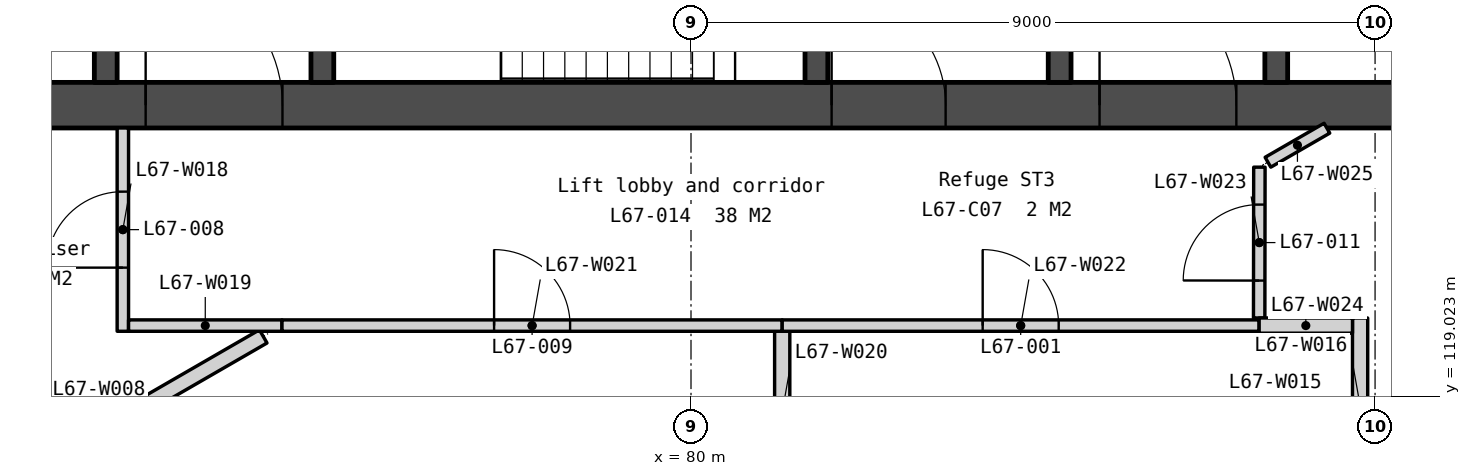
"""IFC4 building model, lengths in metres.
Left out: names, types, materials, properties, quantities, classifications, styles, units other than length and angle.
Written with IfcOpenShell. Run it as: python <this file> out.ifc"""

import sys

from ifc_helpers import new_model, si_unit, direction, frame, frame_2d, origin, place, context, subcontext, project, spatial, polyline, rectangle, outline, extrude, element, fill, save


model = new_model("IFC4")
c1 = context("Model", 3, precision=1e-05, world=origin(), true_north=direction((0.0, 1.0)))
c2 = subcontext(c1, "Body", "Model", "MODEL_VIEW")
j1 = project(units=[si_unit("LENGTHUNIT", "METRE"), si_unit("PLANEANGLEUNIT", "RADIAN")], contexts=[c1])
p1 = place(None, origin())
s1 = spatial("IfcSite", under=j1, at=p1, CompositionType="ELEMENT")
p2 = place(p1, origin())
s2 = spatial("IfcBuilding", under=s1, at=p2, CompositionType="ELEMENT")
p3 = place(p2, frame((0.0, 0.0, 273.8)))
s3 = spatial("IfcBuildingStorey", under=s2, at=p3, CompositionType="ELEMENT", Elevation=273.8)
p4 = place(p3, frame((69.0, 122.85, 0.0), z_axis=(0.0, 0.0, 1.0), x_axis=(1.0, 0.0, 0.0)))
e1 = element("IfcWall", 1, at=p4, inside=s3, PredefinedType="SOLIDWALL", context=c2, shape_type="SweptSolid", body=[
    extrude(rectangle(XDim=22.0, YDim=0.6, at=frame_2d((11.0, 0.0))), origin(), (0.0, 0.0, 1.0), 3.75),
])
p5 = place(p4, frame((16.375, 0.0, 0.0)))
e2 = element("IfcOpeningElement", 2, at=p5, cuts=e1, PredefinedType="OPENING", context=c2, shape_type="SweptSolid", body=[
    extrude(rectangle(XDim=1.8, YDim=2.1, at=frame_2d((0.9, 1.05))), frame((0.0, 0.31, 0.0), z_axis=(0.0, -1.0, 0.0), x_axis=(1.0, 0.0, 0.0)), (0.0, 0.0, 1.0), 0.62),
])
p6 = place(p4, frame((3.825, 0.0, 0.0)))
e3 = element("IfcOpeningElement", 3, at=p6, cuts=e1, PredefinedType="OPENING", context=c2, shape_type="SweptSolid", body=[
    extrude(rectangle(XDim=1.8, YDim=2.1, at=frame_2d((0.9, 1.05))), frame((0.0, 0.31, 0.0), z_axis=(0.0, -1.0, 0.0), x_axis=(1.0, 0.0, 0.0)), (0.0, 0.0, 1.0), 0.62),
])
p7 = place(p4, frame((12.85, 0.0, 0.0)))
e4 = element("IfcOpeningElement", 4, at=p7, cuts=e1, PredefinedType="OPENING", context=c2, shape_type="SweptSolid", body=[
    extrude(rectangle(XDim=1.5, YDim=2.1, at=frame_2d((0.75, 1.05))), frame((0.0, 0.31, 0.0), z_axis=(0.0, -1.0, 0.0), x_axis=(1.0, 0.0, 0.0)), (0.0, 0.0, 1.0), 0.62),
])
p8 = place(p3, frame((72.3, 133.95, 0.0), z_axis=(0.0, 0.0, 1.0), x_axis=(0.0, -1.0, 0.0)))
e5 = element("IfcWall", 5, at=p8, inside=s3, PredefinedType="SOLIDWALL", context=c2, shape_type="SweptSolid", body=[
    extrude(rectangle(XDim=10.8, YDim=0.3, at=frame_2d((5.4, 0.0))), origin(), (0.0, 0.0, 1.0), 3.75),
])
p9 = place(p8, frame((6.95, 0.0, 0.0)))
e6 = element("IfcOpeningElement", 6, at=p9, cuts=e5, PredefinedType="OPENING", context=c2, shape_type="SweptSolid", body=[
    extrude(rectangle(XDim=1.1, YDim=2.1, at=frame_2d((0.55, 1.05))), frame((0.0, 0.16, 0.0), z_axis=(0.0, -1.0, 0.0), x_axis=(1.0, 0.0, 0.0)), (0.0, 0.0, 1.0), 0.32),
])
p10 = place(p8, frame((9.35, 0.0, 0.0)))
e7 = element("IfcOpeningElement", 7, at=p10, cuts=e5, PredefinedType="OPENING", context=c2, shape_type="SweptSolid", body=[
    extrude(rectangle(XDim=0.9, YDim=2.1, at=frame_2d((0.45, 1.05))), frame((0.0, 0.16, 0.0), z_axis=(0.0, -1.0, 0.0), x_axis=(1.0, 0.0, 0.0)), (0.0, 0.0, 1.0), 0.32),
])
p11 = place(p8, frame((5.1, 0.0, 0.0)))
e8 = element("IfcOpeningElement", 8, at=p11, cuts=e5, PredefinedType="OPENING", context=c2, shape_type="SweptSolid", body=[
    extrude(rectangle(XDim=1.0, YDim=2.1, at=frame_2d((0.5, 1.05))), frame((0.0, 0.16, 0.0), z_axis=(0.0, -1.0, 0.0), x_axis=(1.0, 0.0, 0.0)), (0.0, 0.0, 1.0), 0.32),
])
p12 = place(p3, frame((75.15, 125.7, 0.0), z_axis=(0.0, 0.0, 1.0), x_axis=(0.0, -1.0, 0.0)))
e9 = element("IfcWall", 9, at=p12, inside=s3, PredefinedType="SOLIDWALL", context=c2, shape_type="SweptSolid", body=[
    extrude(rectangle(XDim=2.55, YDim=0.3, at=frame_2d((1.275, 0.0))), origin(), (0.0, 0.0, 1.0), 3.75),
])
p13 = place(p3, frame((81.65, 125.7, 0.0), z_axis=(0.0, 0.0, 1.0), x_axis=(0.0, -1.0, 0.0)))
e10 = element("IfcWall", 10, at=p13, inside=s3, PredefinedType="SOLIDWALL", context=c2, shape_type="SweptSolid", body=[
    extrude(rectangle(XDim=2.55, YDim=0.3, at=frame_2d((1.275, 0.0))), origin(), (0.0, 0.0, 1.0), 3.75),
])
p14 = place(p13, frame((0.75, 0.0, 0.0)))
e11 = element("IfcOpeningElement", 11, at=p14, cuts=e10, PredefinedType="OPENING", context=c2, shape_type="SweptSolid", body=[
    extrude(rectangle(XDim=1.0, YDim=2.1, at=frame_2d((0.5, 1.05))), frame((0.0, 0.16, 0.0), z_axis=(0.0, -1.0, 0.0), x_axis=(1.0, 0.0, 0.0)), (0.0, 0.0, 1.0), 0.32),
])
p15 = place(p3, frame((84.85, 125.85, 0.0), z_axis=(0.0, 0.0, 1.0), x_axis=(0.0, -1.0, 0.0)))
e12 = element("IfcWall", 12, at=p15, inside=s3, PredefinedType="SOLIDWALL", context=c2, shape_type="SweptSolid", body=[
    extrude(rectangle(XDim=2.7, YDim=0.3, at=frame_2d((1.35, 0.0))), origin(), (0.0, 0.0, 1.0), 3.75),
])
p16 = place(p3, frame((87.7, 133.95, 0.0), z_axis=(0.0, 0.0, 1.0), x_axis=(0.0, -1.0, 0.0)))
e13 = element("IfcWall", 13, at=p16, inside=s3, PredefinedType="SOLIDWALL", context=c2, shape_type="SweptSolid", body=[
    extrude(rectangle(XDim=10.8, YDim=0.3, at=frame_2d((5.4, 0.0))), origin(), (0.0, 0.0, 1.0), 3.75),
])
p17 = place(p16, frame((6.95, 0.0, 0.0)))
e14 = element("IfcOpeningElement", 14, at=p17, cuts=e13, PredefinedType="OPENING", context=c2, shape_type="SweptSolid", body=[
    extrude(rectangle(XDim=1.1, YDim=2.1, at=frame_2d((0.55, 1.05))), frame((0.0, 0.16, 0.0), z_axis=(0.0, -1.0, 0.0), x_axis=(1.0, 0.0, 0.0)), (0.0, 0.0, 1.0), 0.32),
])
p18 = place(p16, frame((5.1, 0.0, 0.0)))
e15 = element("IfcOpeningElement", 15, at=p18, cuts=e13, PredefinedType="OPENING", context=c2, shape_type="SweptSolid", body=[
    extrude(rectangle(XDim=1.0, YDim=2.1, at=frame_2d((0.5, 1.05))), frame((0.0, 0.16, 0.0), z_axis=(0.0, -1.0, 0.0), x_axis=(1.0, 0.0, 0.0)), (0.0, 0.0, 1.0), 0.32),
])
p19 = place(p16, frame((9.25, 0.0, 0.0)))
e16 = element("IfcOpeningElement", 16, at=p19, cuts=e13, PredefinedType="OPENING", context=c2, shape_type="SweptSolid", body=[
    extrude(rectangle(XDim=1.1, YDim=2.1, at=frame_2d((0.55, 1.05))), frame((0.0, 0.16, 0.0), z_axis=(0.0, -1.0, 0.0), x_axis=(1.0, 0.0, 0.0)), (0.0, 0.0, 1.0), 0.32),
])
p20 = place(p3, frame((60.609, 133.207, -0.15), z_axis=(0.0, 0.0, 1.0), x_axis=(0.500002536638, -0.866023939251, 0.0)))
e17 = element("IfcWall", 17, at=p20, inside=s3, PredefinedType="SOLIDWALL", context=c2, shape_type="SweptSolid", body=[
    extrude(outline(polyline([(36.972, 0.0), (36.972, 3.9), (0.0, 3.9), (0.0, 0.0), (36.972, 0.0)])), frame((0.0, 0.225, 0.0), z_axis=(0.0, -1.0, 0.0), x_axis=(1.0, 0.0, 0.0)), (0.0, 0.0, 1.0), 0.45),
])
p21 = place(p20, frame((0.715, 0.0, 0.95)))
e18 = element("IfcOpeningElement", 18, at=p21, cuts=e17, PredefinedType="OPENING", context=c2, shape_type="SweptSolid", body=[
    extrude(rectangle(XDim=1.2, YDim=2.2, at=frame_2d((0.6, 1.1))), frame((0.0, 0.235, 0.0), z_axis=(0.0, -1.0, 0.0), x_axis=(1.0, 0.0, 0.0)), (0.0, 0.0, 1.0), 0.47),
])
p22 = place(p20, frame((7.793, 0.0, 0.95)))
e19 = element("IfcOpeningElement", 19, at=p22, cuts=e17, PredefinedType="OPENING", context=c2, shape_type="SweptSolid", body=[
    extrude(rectangle(XDim=1.2, YDim=2.2, at=frame_2d((0.6, 1.1))), frame((0.0, 0.235, 0.0), z_axis=(0.0, -1.0, 0.0), x_axis=(1.0, 0.0, 0.0)), (0.0, 0.0, 1.0), 0.47),
])
p23 = place(p20, frame((9.493, 0.0, 0.95)))
e20 = element("IfcOpeningElement", 20, at=p23, cuts=e17, PredefinedType="OPENING", context=c2, shape_type="SweptSolid", body=[
    extrude(rectangle(XDim=1.2, YDim=2.2, at=frame_2d((0.6, 1.1))), frame((0.0, 0.235, 0.0), z_axis=(0.0, -1.0, 0.0), x_axis=(1.0, 0.0, 0.0)), (0.0, 0.0, 1.0), 0.47),
])
p24 = place(p20, frame((17.036, 0.0, 0.95)))
e21 = element("IfcOpeningElement", 21, at=p24, cuts=e17, PredefinedType="OPENING", context=c2, shape_type="SweptSolid", body=[
    extrude(rectangle(XDim=1.2, YDim=2.2, at=frame_2d((0.6, 1.1))), frame((0.0, 0.235, 0.0), z_axis=(0.0, -1.0, 0.0), x_axis=(1.0, 0.0, 0.0)), (0.0, 0.0, 1.0), 0.47),
])
p25 = place(p20, frame((18.736, 0.0, 0.95)))
e22 = element("IfcOpeningElement", 22, at=p25, cuts=e17, PredefinedType="OPENING", context=c2, shape_type="SweptSolid", body=[
    extrude(rectangle(XDim=1.2, YDim=2.2, at=frame_2d((0.6, 1.1))), frame((0.0, 0.235, 0.0), z_axis=(0.0, -1.0, 0.0), x_axis=(1.0, 0.0, 0.0)), (0.0, 0.0, 1.0), 0.47),
])
p26 = place(p20, frame((26.279, 0.0, 0.95)))
e23 = element("IfcOpeningElement", 23, at=p26, cuts=e17, PredefinedType="OPENING", context=c2, shape_type="SweptSolid", body=[
    extrude(rectangle(XDim=1.2, YDim=2.2, at=frame_2d((0.6, 1.1))), frame((0.0, 0.235, 0.0), z_axis=(0.0, -1.0, 0.0), x_axis=(1.0, 0.0, 0.0)), (0.0, 0.0, 1.0), 0.47),
])
p27 = place(p20, frame((27.979, 0.0, 0.95)))
e24 = element("IfcOpeningElement", 24, at=p27, cuts=e17, PredefinedType="OPENING", context=c2, shape_type="SweptSolid", body=[
    extrude(rectangle(XDim=1.2, YDim=2.2, at=frame_2d((0.6, 1.1))), frame((0.0, 0.235, 0.0), z_axis=(0.0, -1.0, 0.0), x_axis=(1.0, 0.0, 0.0)), (0.0, 0.0, 1.0), 0.47),
])
p28 = place(p20, frame((35.058, 0.0, 0.95)))
e25 = element("IfcOpeningElement", 25, at=p28, cuts=e17, PredefinedType="OPENING", context=c2, shape_type="SweptSolid", body=[
    extrude(rectangle(XDim=1.2, YDim=2.2, at=frame_2d((0.6, 1.1))), frame((0.0, 0.235, 0.0), z_axis=(0.0, -1.0, 0.0), x_axis=(1.0, 0.0, 0.0)), (0.0, 0.0, 1.0), 0.47),
])
p29 = place(p3, frame((86.427, 110.752, -0.15), z_axis=(0.0, 0.0, 1.0), x_axis=(0.500000383388, 0.866025182435, 0.0)))
e26 = element("IfcWall", 26, at=p29, inside=s3, PredefinedType="SOLIDWALL", context=c2, shape_type="SweptSolid", body=[
    extrude(outline(polyline([(25.929, 3.9), (25.929, 0.0), (0.0, 0.0), (0.0, 3.9), (25.929, 3.9)])), frame((0.0, 0.225, 0.0), z_axis=(0.0, -1.0, 0.0), x_axis=(1.0, 0.0, 0.0)), (0.0, 0.0, 1.0), 0.45),
])
p30 = place(p29, frame((5.993, 0.0, 0.95)))
e27 = element("IfcOpeningElement", 27, at=p30, cuts=e26, PredefinedType="OPENING", context=c2, shape_type="SweptSolid", body=[
    extrude(rectangle(XDim=1.2, YDim=2.2, at=frame_2d((0.6, 1.1))), frame((0.0, 0.235, 0.0), z_axis=(0.0, -1.0, 0.0), x_axis=(1.0, 0.0, 0.0)), (0.0, 0.0, 1.0), 0.47),
])
p31 = place(p29, frame((7.693, 0.0, 0.95)))
e28 = element("IfcOpeningElement", 28, at=p31, cuts=e26, PredefinedType="OPENING", context=c2, shape_type="SweptSolid", body=[
    extrude(rectangle(XDim=1.2, YDim=2.2, at=frame_2d((0.6, 1.1))), frame((0.0, 0.235, 0.0), z_axis=(0.0, -1.0, 0.0), x_axis=(1.0, 0.0, 0.0)), (0.0, 0.0, 1.0), 0.47),
])
p32 = place(p29, frame((15.236, 0.0, 0.95)))
e29 = element("IfcOpeningElement", 29, at=p32, cuts=e26, PredefinedType="OPENING", context=c2, shape_type="SweptSolid", body=[
    extrude(rectangle(XDim=1.2, YDim=2.2, at=frame_2d((0.6, 1.1))), frame((0.0, 0.235, 0.0), z_axis=(0.0, -1.0, 0.0), x_axis=(1.0, 0.0, 0.0)), (0.0, 0.0, 1.0), 0.47),
])
p33 = place(p29, frame((16.936, 0.0, 0.95)))
e30 = element("IfcOpeningElement", 30, at=p33, cuts=e26, PredefinedType="OPENING", context=c2, shape_type="SweptSolid", body=[
    extrude(rectangle(XDim=1.2, YDim=2.2, at=frame_2d((0.6, 1.1))), frame((0.0, 0.235, 0.0), z_axis=(0.0, -1.0, 0.0), x_axis=(1.0, 0.0, 0.0)), (0.0, 0.0, 1.0), 0.47),
])
p34 = place(p29, frame((24.015, 0.0, 0.95)))
e31 = element("IfcOpeningElement", 31, at=p34, cuts=e26, PredefinedType="OPENING", context=c2, shape_type="SweptSolid", body=[
    extrude(rectangle(XDim=1.2, YDim=2.2, at=frame_2d((0.6, 1.1))), frame((0.0, 0.235, 0.0), z_axis=(0.0, -1.0, 0.0), x_axis=(1.0, 0.0, 0.0)), (0.0, 0.0, 1.0), 0.47),
])
p35 = place(p3, frame((70.047, 117.31, 0.0), z_axis=(0.0, 0.0, 1.0), x_axis=(0.866032544947, 0.499987630939, 0.0)))
e32 = element("IfcWall", 32, at=p35, inside=s3, PredefinedType="PARTITIONING", context=c2, shape_type="SweptSolid", body=[
    extrude(rectangle(XDim=4.994, YDim=0.2, at=frame_2d((2.497, 0.0))), origin(), (0.0, 0.0, 1.0), 3.75),
])
p36 = place(p3, frame((88.803, 120.05, 0.0), z_axis=(0.0, 0.0, 1.0), x_axis=(0.0, -1.0, 0.0)))
e33 = element("IfcWall", 33, at=p36, inside=s3, PredefinedType="PARTITIONING", context=c2, shape_type="SweptSolid", body=[
    extrude(rectangle(XDim=2.3, YDim=0.2, at=frame_2d((1.15, 0.0))), origin(), (0.0, 0.0, 1.0), 3.062),
])
p37 = place(p3, frame((72.525, 119.875, 0.0), z_axis=(0.0, 0.0, 1.0), x_axis=(0.0, 1.0, 0.0)))
e34 = element("IfcWall", 34, at=p37, inside=s3, PredefinedType="PARTITIONING", context=c2, shape_type="SweptSolid", body=[
    extrude(rectangle(XDim=2.675, YDim=0.15, at=frame_2d((1.337, 0.0))), origin(), (0.0, 0.0, 1.0), 3.75),
])
p38 = place(p37, frame((0.837, 0.0, 0.0)))
e35 = element("IfcOpeningElement", 35, at=p38, cuts=e34, PredefinedType="OPENING", context=c2, shape_type="SweptSolid", body=[
    extrude(rectangle(XDim=1.0, YDim=2.1, at=frame_2d((0.5, 1.05))), frame((0.0, 0.085, 0.0), z_axis=(0.0, -1.0, 0.0), x_axis=(1.0, 0.0, 0.0)), (0.0, 0.0, 1.0), 0.17),
])
p39 = place(p3, frame((72.6, 119.95, 0.0), z_axis=(0.0, 0.0, 1.0), x_axis=(1.0, 0.0, 0.0)))
e36 = element("IfcWall", 36, at=p39, inside=s3, PredefinedType="PARTITIONING", context=c2, shape_type="SweptSolid", body=[
    extrude(rectangle(XDim=2.019, YDim=0.15, at=frame_2d((1.009, 0.0))), origin(), (0.0, 0.0, 1.0), 3.75),
])
p40 = place(p3, frame((81.2, 117.75, 0.0), z_axis=(0.0, 0.0, 1.0), x_axis=(0.0, 1.0, 0.0)))
e37 = element("IfcWall", 37, at=p40, inside=s3, PredefinedType="PARTITIONING", context=c2, shape_type="SweptSolid", body=[
    extrude(rectangle(XDim=2.125, YDim=0.2, at=frame_2d((1.062, 0.0))), origin(), (0.0, 0.0, 1.0), 3.75),
])
p41 = place(p3, frame((74.619, 119.95, 0.0), z_axis=(0.0, 0.0, 1.0), x_axis=(1.0, 0.0, 0.0)))
e38 = element("IfcWall", 38, at=p41, inside=s3, PredefinedType="PARTITIONING", context=c2, shape_type="SweptSolid", body=[
    extrude(rectangle(XDim=6.581, YDim=0.15, at=frame_2d((3.291, 0.0))), origin(), (0.0, 0.0, 1.0), 3.75),
])
p42 = place(p41, frame((2.791, 0.0, 0.0)))
e39 = element("IfcOpeningElement", 39, at=p42, cuts=e38, PredefinedType="OPENING", context=c2, shape_type="SweptSolid", body=[
    extrude(rectangle(XDim=1.0, YDim=2.1, at=frame_2d((0.5, 1.05))), frame((0.0, 0.085, 0.0), z_axis=(0.0, -1.0, 0.0), x_axis=(1.0, 0.0, 0.0)), (0.0, 0.0, 1.0), 0.17),
])
p43 = place(p3, frame((81.2, 119.95, 0.0), z_axis=(0.0, 0.0, 1.0), x_axis=(1.0, 0.0, 0.0)))
e40 = element("IfcWall", 40, at=p43, inside=s3, PredefinedType="PARTITIONING", context=c2, shape_type="SweptSolid", body=[
    extrude(rectangle(XDim=6.275, YDim=0.15, at=frame_2d((3.137, 0.0))), origin(), (0.0, 0.0, 1.0), 3.75),
])
p44 = place(p43, frame((2.637, 0.0, 0.0)))
e41 = element("IfcOpeningElement", 41, at=p44, cuts=e40, PredefinedType="OPENING", context=c2, shape_type="SweptSolid", body=[
    extrude(rectangle(XDim=1.0, YDim=2.1, at=frame_2d((0.5, 1.05))), frame((0.0, 0.085, 0.0), z_axis=(0.0, -1.0, 0.0), x_axis=(1.0, 0.0, 0.0)), (0.0, 0.0, 1.0), 0.17),
])
p45 = place(p3, frame((87.475, 120.05, 0.0), z_axis=(0.0, 0.0, 1.0), x_axis=(0.001476558006, 0.999998909888, 0.0)))
e42 = element("IfcWall", 42, at=p45, inside=s3, PredefinedType="PARTITIONING", context=c2, shape_type="SweptSolid", body=[
    extrude(rectangle(XDim=1.984, YDim=0.15, at=frame_2d((0.992, 0.0))), origin(), (0.0, 0.0, 1.0), 3.75),
])
p46 = place(p45, frame((0.492, 0.0, 0.0)))
e43 = element("IfcOpeningElement", 43, at=p46, cuts=e42, PredefinedType="OPENING", context=c2, shape_type="SweptSolid", body=[
    extrude(rectangle(XDim=1.0, YDim=2.1, at=frame_2d((0.5, 1.05))), frame((0.0, 0.085, 0.0), z_axis=(0.0, -1.0, 0.0), x_axis=(1.0, 0.0, 0.0)), (0.0, 0.0, 1.0), 0.17),
])
p47 = place(p3, frame((87.475, 119.95, 0.0), z_axis=(0.0, 0.0, 1.0), x_axis=(1.0, 0.0, 0.0)))
e44 = element("IfcWall", 44, at=p47, inside=s3, PredefinedType="PARTITIONING", context=c2, shape_type="SweptSolid", body=[
    extrude(rectangle(XDim=1.228, YDim=0.2, at=frame_2d((0.614, 0.0))), origin(), (0.0, 0.0, 1.0), 3.75),
])
p48 = place(p3, frame((87.591, 122.099, 0.0), z_axis=(0.0, 0.0, 1.0), x_axis=(0.866072174983, 0.499918981156, 0.0)))
e45 = element("IfcWall", 45, at=p48, inside=s3, PredefinedType="PARTITIONING", context=c2, shape_type="SweptSolid", body=[
    extrude(rectangle(XDim=0.896, YDim=0.15, at=frame_2d((0.448, 0.0))), origin(), (0.0, 0.0, 1.0), 3.75),
])
p49 = place(p5, origin())
e46 = element("IfcDoor", 46, at=p49, inside=s3, OperationType="DOUBLE_DOOR_DOUBLE_SWING", PredefinedType="DOOR", context=c2, shape_type="SweptSolid", body=[
    extrude(rectangle(XDim=1.8, YDim=2.1, at=frame_2d((0.9, 1.05))), frame((0.0, 0.025, 0.0), z_axis=(0.0, -1.0, 0.0), x_axis=(1.0, 0.0, 0.0)), (0.0, 0.0, 1.0), 0.05),
])
fill(e2, e46)
p50 = place(p6, origin())
e47 = element("IfcDoor", 47, at=p50, inside=s3, OperationType="DOUBLE_DOOR_DOUBLE_SWING", PredefinedType="DOOR", context=c2, shape_type="SweptSolid", body=[
    extrude(rectangle(XDim=1.8, YDim=2.1, at=frame_2d((0.9, 1.05))), frame((0.0, 0.025, 0.0), z_axis=(0.0, -1.0, 0.0), x_axis=(1.0, 0.0, 0.0)), (0.0, 0.0, 1.0), 0.05),
])
fill(e3, e47)
p51 = place(p7, origin())
e48 = element("IfcDoor", 48, at=p51, inside=s3, OperationType="DOUBLE_DOOR_DOUBLE_SWING", PredefinedType="DOOR", context=c2, shape_type="SweptSolid", body=[
    extrude(rectangle(XDim=1.5, YDim=2.1, at=frame_2d((0.75, 1.05))), frame((0.0, 0.025, 0.0), z_axis=(0.0, -1.0, 0.0), x_axis=(1.0, 0.0, 0.0)), (0.0, 0.0, 1.0), 0.05),
])
fill(e4, e48)
p52 = place(p44, origin())
e49 = element("IfcDoor", 49, at=p52, inside=s3, OperationType="SINGLE_SWING_LEFT", PredefinedType="DOOR", context=c2, shape_type="SweptSolid", body=[
    extrude(rectangle(XDim=1.0, YDim=2.1, at=frame_2d((0.5, 1.05))), frame((0.0, 0.025, 0.0), z_axis=(0.0, -1.0, 0.0), x_axis=(1.0, 0.0, 0.0)), (0.0, 0.0, 1.0), 0.05),
])
fill(e41, e49)
p53 = place(p38, origin())
e50 = element("IfcDoor", 50, at=p53, inside=s3, OperationType="SINGLE_SWING_LEFT", PredefinedType="DOOR", context=c2, shape_type="SweptSolid", body=[
    extrude(rectangle(XDim=1.0, YDim=2.1, at=frame_2d((0.5, 1.05))), frame((0.0, 0.025, 0.0), z_axis=(0.0, -1.0, 0.0), x_axis=(1.0, 0.0, 0.0)), (0.0, 0.0, 1.0), 0.05),
])
fill(e35, e50)
p54 = place(p42, origin())
e51 = element("IfcDoor", 51, at=p54, inside=s3, OperationType="SINGLE_SWING_LEFT", PredefinedType="DOOR", context=c2, shape_type="SweptSolid", body=[
    extrude(rectangle(XDim=1.0, YDim=2.1, at=frame_2d((0.5, 1.05))), frame((0.0, 0.025, 0.0), z_axis=(0.0, -1.0, 0.0), x_axis=(1.0, 0.0, 0.0)), (0.0, 0.0, 1.0), 0.05),
])
fill(e39, e51)
p55 = place(p46, origin())
e52 = element("IfcDoor", 52, at=p55, inside=s3, OperationType="SINGLE_SWING_LEFT", PredefinedType="DOOR", context=c2, shape_type="SweptSolid", body=[
    extrude(rectangle(XDim=1.0, YDim=2.1, at=frame_2d((0.5, 1.05))), frame((0.0, 0.025, 0.0), z_axis=(0.0, -1.0, 0.0), x_axis=(1.0, 0.0, 0.0)), (0.0, 0.0, 1.0), 0.05),
])
fill(e43, e52)
save(model, sys.argv[1])
